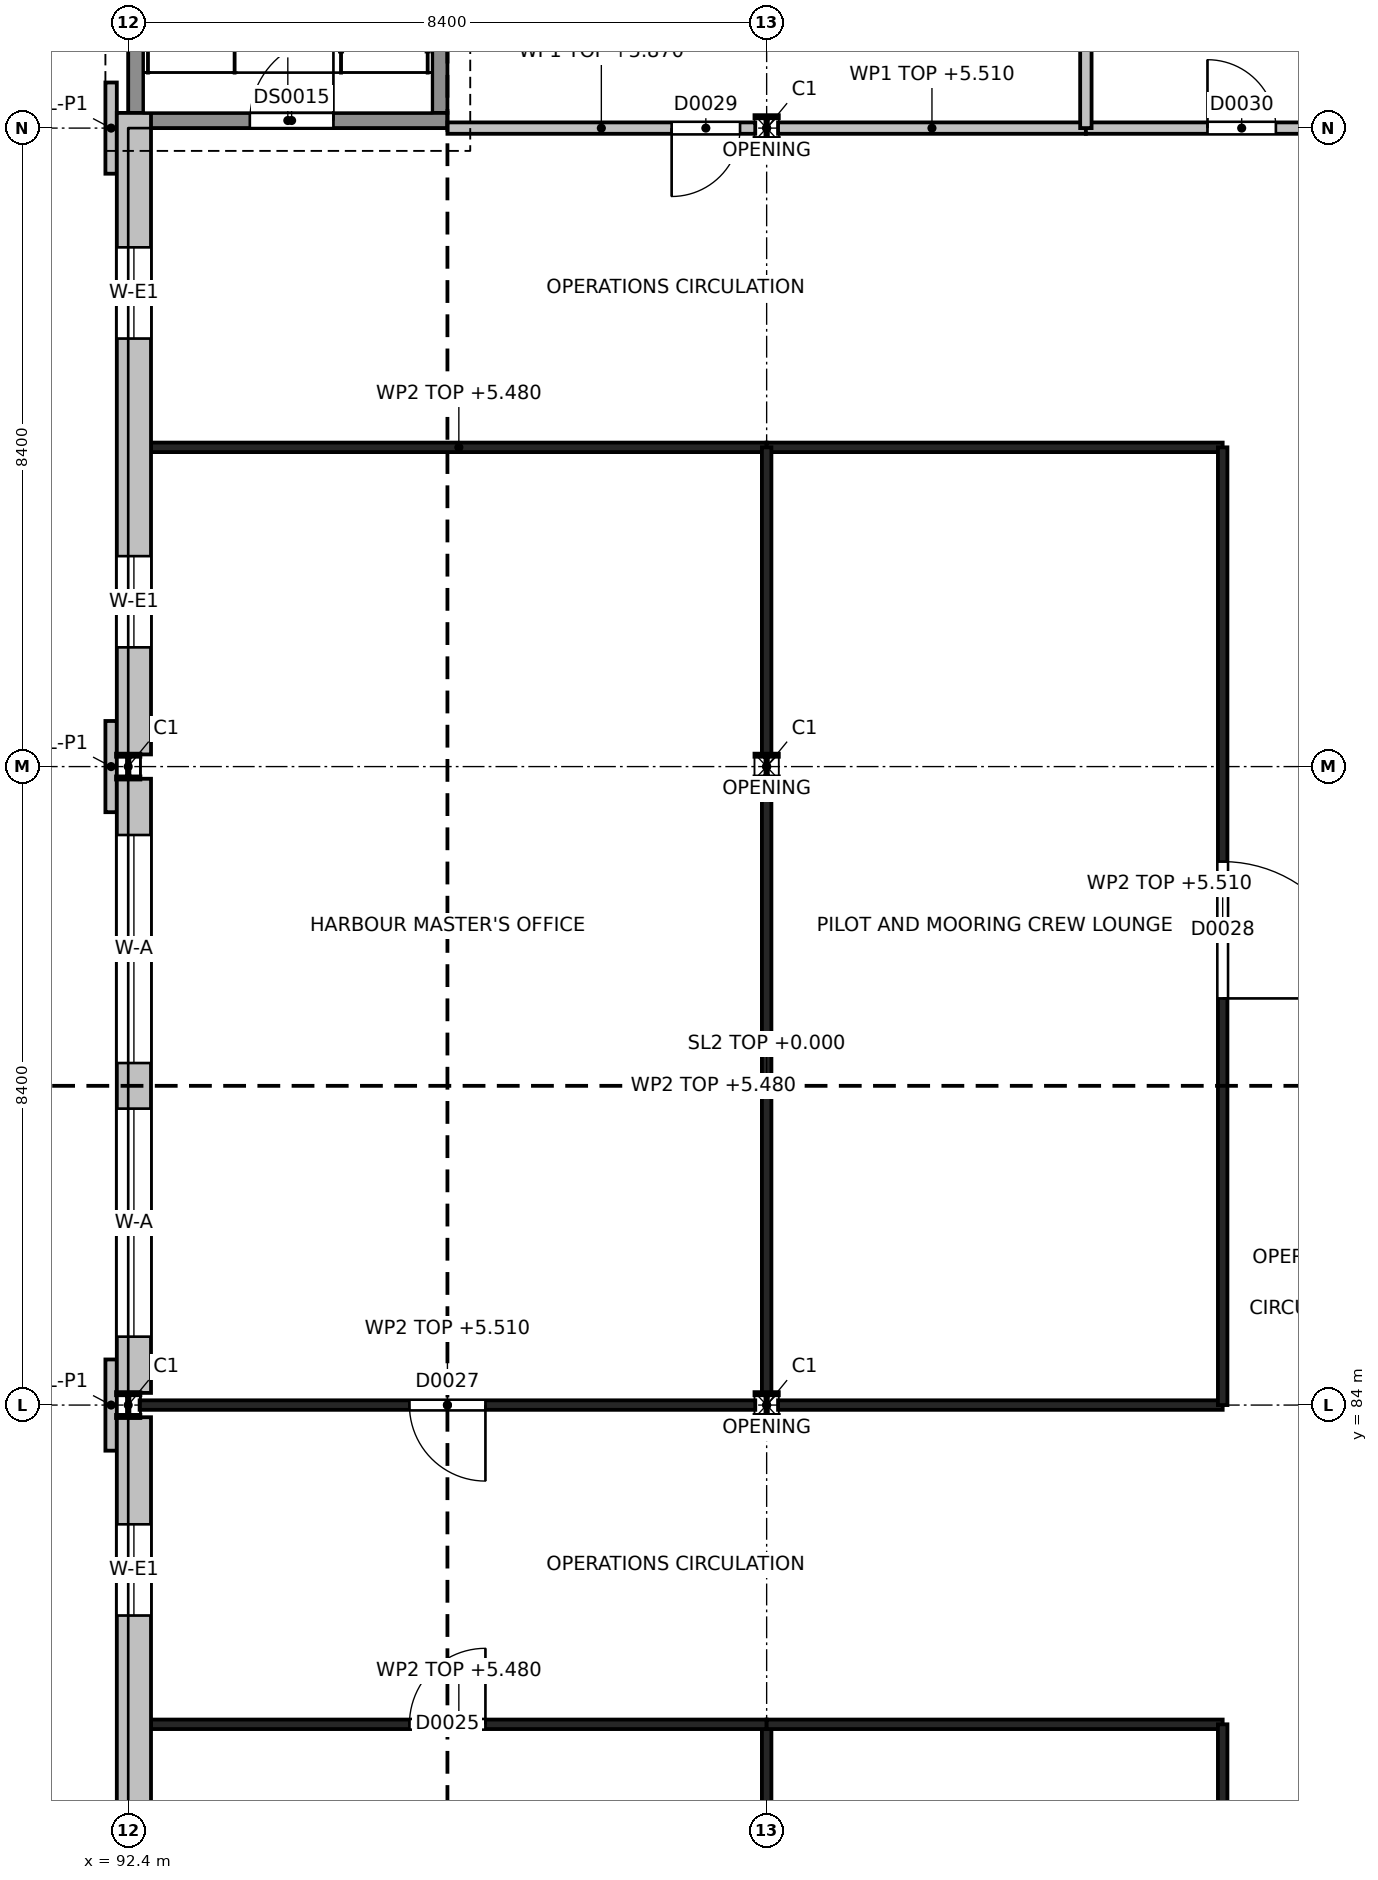
"""IFC4 building model, lengths in metres.
Left out: names, types, materials, properties, quantities, classifications, styles, units other than length and angle.
Written with IfcOpenShell. Run it as: python <this file> out.ifc"""

import sys

from ifc_helpers import new_model, si_unit, direction, frame, frame_2d, origin, origin_2d, place, context, subcontext, project, spatial, rectangle, i_section, extrude, element, fill, save


model = new_model("IFC4")
c1 = context("Model", 3, precision=1e-05, world=origin(), true_north=direction((0.0, 1.0)))
c2 = subcontext(c1, "Body", "Model", "MODEL_VIEW")
j1 = project(units=[si_unit("LENGTHUNIT", "METRE"), si_unit("PLANEANGLEUNIT", "RADIAN")], contexts=[c1])
p1 = place(None, origin())
s1 = spatial("IfcSite", under=j1, at=p1, CompositionType="ELEMENT")
p2 = place(p1, origin())
s2 = spatial("IfcBuilding", under=s1, at=p2, CompositionType="ELEMENT")
p3 = place(p2, origin())
s3 = spatial("IfcBuildingStorey", under=s2, at=p3, CompositionType="ELEMENT", Elevation=0.0)
for number, where, z_axis, x_axis in (
    (1, (92.4, 84.0, -1.35), (0.0, 0.0, 1.0), (1.0, 0.0, 0.0)),
    (2, (92.4, 92.4, -1.35), (0.0, 0.0, 1.0), (1.0, 0.0, 0.0)),
    (3, (100.8, 84.0, -1.35), (0.0, 0.0, 1.0), (1.0, 0.0, 0.0)),
    (4, (100.8, 92.4, -1.35), (0.0, 0.0, 1.0), (1.0, 0.0, 0.0)),
    (5, (100.8, 100.8, -1.35), (0.0, 0.0, 1.0), (1.0, 0.0, 0.0)),
):
    element("IfcColumn", number, at=place(p3, frame(where, z_axis=z_axis, x_axis=x_axis)), inside=s3, PredefinedType="COLUMN", context=c2, shape_type="SweptSolid", body=[
        extrude(i_section(OverallWidth=0.3, OverallDepth=0.32, WebThickness=0.011, FlangeThickness=0.021, at=origin_2d()), origin(), (0.0, 0.0, 1.0), 7.35),
    ])
p4 = place(p3, frame((92.4, 100.9, -1.35), z_axis=(0.0, 0.0, 1.0), x_axis=(1.0, 0.0, 0.0)))
e6 = element("IfcWall", 6, at=p4, inside=s3, PredefinedType="SHEAR", context=c2, shape_type="SweptSolid", body=[
    extrude(rectangle(XDim=4.2, YDim=0.2, at=frame_2d((2.1, 0.0))), origin(), (0.0, 0.0, 1.0), 7.35),
])
p5 = place(p4, frame((1.6, 0.0, 1.35)))
e7 = element("IfcOpeningElement", 7, at=p5, cuts=e6, PredefinedType="OPENING", context=c2, shape_type="SweptSolid", body=[
    extrude(rectangle(XDim=1.1, YDim=2.1, at=frame_2d((0.55, 1.05))), frame((0.0, 0.1, 0.0), z_axis=(0.0, -1.0, 0.0), x_axis=(1.0, 0.0, 0.0)), (0.0, 0.0, 1.0), 0.2),
])
p6 = place(p3, frame((92.5, 101.0, -1.35), z_axis=(0.0, 0.0, 1.0), x_axis=(0.0, 1.0, 0.0)))
e8 = element("IfcWall", 8, at=p6, inside=s3, PredefinedType="SHEAR", context=c2, shape_type="SweptSolid", body=[
    extrude(rectangle(XDim=8.0, YDim=0.2, at=frame_2d((4.0, 0.0))), origin(), (0.0, 0.0, 1.0), 7.35),
])
p7 = place(p6, frame((3.25, 0.0, 1.35)))
e9 = element("IfcOpeningElement", 9, at=p7, cuts=e8, PredefinedType="OPENING", context=c2, shape_type="SweptSolid", body=[
    extrude(rectangle(XDim=1.5, YDim=2.4, at=frame_2d((0.75, 1.2))), frame((0.0, 0.1, 0.0), z_axis=(0.0, -1.0, 0.0), x_axis=(1.0, 0.0, 0.0)), (0.0, 0.0, 1.0), 0.2),
])
p8 = place(p3, frame((96.5, 101.0, -1.35), z_axis=(0.0, 0.0, 1.0), x_axis=(0.0, 1.0, 0.0)))
e10 = element("IfcWall", 10, at=p8, inside=s3, PredefinedType="SHEAR", context=c2, shape_type="SweptSolid", body=[
    extrude(rectangle(XDim=8.0, YDim=0.2, at=frame_2d((4.0, 0.0))), origin(), (0.0, 0.0, 1.0), 7.35),
])
p9 = place(p3, frame((92.475, 75.76, 0.0), z_axis=(0.0, 0.0, 1.0), x_axis=(0.0, 1.0, 0.0)))
e11 = element("IfcWall", 11, at=p9, inside=s3, PredefinedType="SOLIDWALL", context=c2, shape_type="SweptSolid", body=[
    extrude(rectangle(XDim=8.08, YDim=0.45, at=frame_2d((4.04, 0.0))), origin(), (0.0, 0.0, 1.0), 5.25),
])
p10 = place(p9, frame((1.409, 0.0, 0.9)))
e12 = element("IfcOpeningElement", 12, at=p10, cuts=e11, PredefinedType="OPENING", context=c2, shape_type="SweptSolid", body=[
    extrude(rectangle(XDim=1.2, YDim=3.0, at=frame_2d((0.6, 1.5))), frame((0.0, 0.225, 0.0), z_axis=(0.0, -1.0, 0.0), x_axis=(1.0, 0.0, 0.0)), (0.0, 0.0, 1.0), 0.45),
])
p11 = place(p9, frame((5.471, 0.0, 0.9)))
e13 = element("IfcOpeningElement", 13, at=p11, cuts=e11, PredefinedType="OPENING", context=c2, shape_type="SweptSolid", body=[
    extrude(rectangle(XDim=1.2, YDim=3.0, at=frame_2d((0.6, 1.5))), frame((0.0, 0.225, 0.0), z_axis=(0.0, -1.0, 0.0), x_axis=(1.0, 0.0, 0.0)), (0.0, 0.0, 1.0), 0.45),
])
p12 = place(p3, frame((92.475, 84.16, 0.0), z_axis=(0.0, 0.0, 1.0), x_axis=(0.0, 1.0, 0.0)))
e14 = element("IfcWall", 14, at=p12, inside=s3, PredefinedType="SOLIDWALL", context=c2, shape_type="SweptSolid", body=[
    extrude(rectangle(XDim=8.08, YDim=0.45, at=frame_2d((4.04, 0.0))), origin(), (0.0, 0.0, 1.0), 5.25),
])
p13 = place(p12, frame((0.74, 0.0, 0.9)))
e15 = element("IfcOpeningElement", 15, at=p13, cuts=e14, PredefinedType="OPENING", context=c2, shape_type="SweptSolid", body=[
    extrude(rectangle(XDim=3.0, YDim=3.6, at=frame_2d((1.5, 1.8))), frame((0.0, 0.225, 0.0), z_axis=(0.0, -1.0, 0.0), x_axis=(1.0, 0.0, 0.0)), (0.0, 0.0, 1.0), 0.45),
])
p14 = place(p12, frame((4.34, 0.0, 0.9)))
e16 = element("IfcOpeningElement", 16, at=p14, cuts=e14, PredefinedType="OPENING", context=c2, shape_type="SweptSolid", body=[
    extrude(rectangle(XDim=3.0, YDim=3.6, at=frame_2d((1.5, 1.8))), frame((0.0, 0.225, 0.0), z_axis=(0.0, -1.0, 0.0), x_axis=(1.0, 0.0, 0.0)), (0.0, 0.0, 1.0), 0.45),
])
p15 = place(p3, frame((92.475, 92.56, 0.0), z_axis=(0.0, 0.0, 1.0), x_axis=(0.0, 1.0, 0.0)))
e17 = element("IfcWall", 17, at=p15, inside=s3, PredefinedType="SOLIDWALL", context=c2, shape_type="SweptSolid", body=[
    extrude(rectangle(XDim=8.44, YDim=0.45, at=frame_2d((4.22, 0.0))), origin(), (0.0, 0.0, 1.0), 5.25),
])
p16 = place(p15, frame((1.409, 0.0, 0.9)))
e18 = element("IfcOpeningElement", 18, at=p16, cuts=e17, PredefinedType="OPENING", context=c2, shape_type="SweptSolid", body=[
    extrude(rectangle(XDim=1.2, YDim=3.0, at=frame_2d((0.6, 1.5))), frame((0.0, 0.225, 0.0), z_axis=(0.0, -1.0, 0.0), x_axis=(1.0, 0.0, 0.0)), (0.0, 0.0, 1.0), 0.45),
])
p17 = place(p15, frame((5.471, 0.0, 0.9)))
e19 = element("IfcOpeningElement", 19, at=p17, cuts=e17, PredefinedType="OPENING", context=c2, shape_type="SweptSolid", body=[
    extrude(rectangle(XDim=1.2, YDim=3.0, at=frame_2d((0.6, 1.5))), frame((0.0, 0.225, 0.0), z_axis=(0.0, -1.0, 0.0), x_axis=(1.0, 0.0, 0.0)), (0.0, 0.0, 1.0), 0.45),
])
p18 = place(p3, frame((92.175, 83.4, 0.0), z_axis=(0.0, 0.0, 1.0), x_axis=(0.0, 1.0, 0.0)))
e20 = element("IfcWall", 20, at=p18, inside=s3, PredefinedType="SOLIDWALL", context=c2, shape_type="SweptSolid", body=[
    extrude(rectangle(XDim=1.2, YDim=0.15, at=frame_2d((0.6, 0.0))), origin(), (0.0, 0.0, 1.0), 6.0),
])
for number, where, z_axis, x_axis in (
    (21, (92.175, 91.8, 0.0), (0.0, 0.0, 1.0), (0.0, 1.0, 0.0)),
    (22, (92.175, 100.2, 0.0), (0.0, 0.0, 1.0), (0.0, 1.0, 0.0)),
):
    element("IfcWall", number, at=place(p3, frame(where, z_axis=z_axis, x_axis=x_axis)), inside=s3, PredefinedType="SOLIDWALL", context=c2, shape_type="SweptSolid", body=[
        extrude(rectangle(XDim=1.2, YDim=0.15, at=frame_2d((0.6, 0.0))), origin(), (0.0, 0.0, 1.0), 6.0),
    ])
p19 = place(p3, frame((100.8, 75.76, 0.0), z_axis=(0.0, 0.0, 1.0), x_axis=(0.0, 1.0, 0.0)))
e23 = element("IfcWall", 23, at=p19, inside=s3, PredefinedType="PARTITIONING", context=c2, shape_type="SweptSolid", body=[
    extrude(rectangle(XDim=4.04, YDim=0.125, at=frame_2d((2.02, 0.0))), origin(), (0.0, 0.0, 1.0), 5.48),
])
p20 = place(p3, frame((92.7, 79.8, 0.0), z_axis=(0.0, 0.0, 1.0), x_axis=(1.0, 0.0, 0.0)))
e24 = element("IfcWall", 24, at=p20, inside=s3, PredefinedType="PARTITIONING", context=c2, shape_type="SweptSolid", body=[
    extrude(rectangle(XDim=8.1, YDim=0.125, at=frame_2d((4.05, 0.0))), origin(), (0.0, 0.0, 1.0), 5.48),
])
p21 = place(p20, frame((3.399, 0.0, 0.0)))
e25 = element("IfcOpeningElement", 25, at=p21, cuts=e24, PredefinedType="OPENING", context=c2, shape_type="SweptSolid", body=[
    extrude(rectangle(XDim=1.0, YDim=2.2, at=frame_2d((0.5, 1.1))), frame((0.0, 0.062, 0.0), z_axis=(0.0, -1.0, 0.0), x_axis=(1.0, 0.0, 0.0)), (0.0, 0.0, 1.0), 0.125),
])
p22 = place(p3, frame((100.8, 79.8, 0.0), z_axis=(0.0, 0.0, 1.0), x_axis=(1.0, 0.0, 0.0)))
e26 = element("IfcWall", 26, at=p22, inside=s3, PredefinedType="PARTITIONING", context=c2, shape_type="SweptSolid", body=[
    extrude(rectangle(XDim=6.0, YDim=0.125, at=frame_2d((3.0, 0.0))), origin(), (0.0, 0.0, 1.0), 5.48),
])
p23 = place(p3, frame((106.8, 69.6, 0.0), z_axis=(0.0, 0.0, 1.0), x_axis=(0.0, 1.0, 0.0)))
e27 = element("IfcWall", 27, at=p23, inside=s3, PredefinedType="PARTITIONING", context=c2, shape_type="SweptSolid", body=[
    extrude(rectangle(XDim=10.2, YDim=0.125, at=frame_2d((5.1, 0.0))), origin(), (0.0, 0.0, 1.0), 5.51),
])
p24 = place(p23, frame((4.15, 0.0, 0.0)))
e28 = element("IfcOpeningElement", 28, at=p24, cuts=e27, PredefinedType="OPENING", context=c2, shape_type="SweptSolid", body=[
    extrude(rectangle(XDim=1.8, YDim=2.1, at=frame_2d((0.9, 1.05))), frame((0.0, 0.062, 0.0), z_axis=(0.0, -1.0, 0.0), x_axis=(1.0, 0.0, 0.0)), (0.0, 0.0, 1.0), 0.125),
])
p25 = place(p3, frame((92.55, 84.0, 0.0), z_axis=(0.0, 0.0, 1.0), x_axis=(1.0, 0.0, 0.0)))
e29 = element("IfcWall", 29, at=p25, inside=s3, PredefinedType="PARTITIONING", context=c2, shape_type="SweptSolid", body=[
    extrude(rectangle(XDim=8.1, YDim=0.125, at=frame_2d((4.05, 0.0))), origin(), (0.0, 0.0, 1.0), 5.51),
])
p26 = place(p25, frame((3.55, 0.0, 0.0)))
e30 = element("IfcOpeningElement", 30, at=p26, cuts=e29, PredefinedType="OPENING", context=c2, shape_type="SweptSolid", body=[
    extrude(rectangle(XDim=1.0, YDim=2.2, at=frame_2d((0.5, 1.1))), frame((0.0, 0.062, 0.0), z_axis=(0.0, -1.0, 0.0), x_axis=(1.0, 0.0, 0.0)), (0.0, 0.0, 1.0), 0.125),
])
p27 = place(p3, frame((92.7, 96.6, 0.0), z_axis=(0.0, 0.0, 1.0), x_axis=(1.0, 0.0, 0.0)))
e31 = element("IfcWall", 31, at=p27, inside=s3, PredefinedType="PARTITIONING", context=c2, shape_type="SweptSolid", body=[
    extrude(rectangle(XDim=8.1, YDim=0.125, at=frame_2d((4.05, 0.0))), origin(), (0.0, 0.0, 1.0), 5.48),
])
p28 = place(p3, frame((100.95, 84.0, 0.0), z_axis=(0.0, 0.0, 1.0), x_axis=(1.0, 0.0, 0.0)))
e32 = element("IfcWall", 32, at=p28, inside=s3, PredefinedType="PARTITIONING", context=c2, shape_type="SweptSolid", body=[
    extrude(rectangle(XDim=5.85, YDim=0.125, at=frame_2d((2.925, 0.0))), origin(), (0.0, 0.0, 1.0), 5.51),
])
p29 = place(p3, frame((100.8, 96.6, 0.0), z_axis=(0.0, 0.0, 1.0), x_axis=(1.0, 0.0, 0.0)))
e33 = element("IfcWall", 33, at=p29, inside=s3, PredefinedType="PARTITIONING", context=c2, shape_type="SweptSolid", body=[
    extrude(rectangle(XDim=6.0, YDim=0.125, at=frame_2d((3.0, 0.0))), origin(), (0.0, 0.0, 1.0), 5.48),
])
p30 = place(p3, frame((106.8, 84.0, 0.0), z_axis=(0.0, 0.0, 1.0), x_axis=(0.0, 1.0, 0.0)))
e34 = element("IfcWall", 34, at=p30, inside=s3, PredefinedType="PARTITIONING", context=c2, shape_type="SweptSolid", body=[
    extrude(rectangle(XDim=12.6, YDim=0.125, at=frame_2d((6.3, 0.0))), origin(), (0.0, 0.0, 1.0), 5.51),
])
p31 = place(p30, frame((5.35, 0.0, 0.0)))
e35 = element("IfcOpeningElement", 35, at=p31, cuts=e34, PredefinedType="OPENING", context=c2, shape_type="SweptSolid", body=[
    extrude(rectangle(XDim=1.8, YDim=2.1, at=frame_2d((0.9, 1.05))), frame((0.0, 0.062, 0.0), z_axis=(0.0, -1.0, 0.0), x_axis=(1.0, 0.0, 0.0)), (0.0, 0.0, 1.0), 0.125),
])
p32 = place(p3, frame((96.6, 100.8, 0.0), z_axis=(0.0, 0.0, 1.0), x_axis=(1.0, 0.0, 0.0)))
e36 = element("IfcWall", 36, at=p32, inside=s3, PredefinedType="PARTITIONING", context=c2, shape_type="SweptSolid", body=[
    extrude(rectangle(XDim=4.05, YDim=0.15, at=frame_2d((2.025, 0.0))), origin(), (0.0, 0.0, 1.0), 5.87),
])
p33 = place(p32, frame((2.95, 0.0, 0.0)))
e37 = element("IfcOpeningElement", 37, at=p33, cuts=e36, PredefinedType="OPENING", context=c2, shape_type="SweptSolid", body=[
    extrude(rectangle(XDim=0.9, YDim=2.1, at=frame_2d((0.45, 1.05))), frame((0.0, 0.075, 0.0), z_axis=(0.0, -1.0, 0.0), x_axis=(1.0, 0.0, 0.0)), (0.0, 0.0, 1.0), 0.15),
])
p34 = place(p3, frame((100.95, 100.8, 0.0), z_axis=(0.0, 0.0, 1.0), x_axis=(1.0, 0.0, 0.0)))
e38 = element("IfcWall", 38, at=p34, inside=s3, PredefinedType="PARTITIONING", context=c2, shape_type="SweptSolid", body=[
    extrude(rectangle(XDim=4.05, YDim=0.15, at=frame_2d((2.025, 0.0))), origin(), (0.0, 0.0, 1.0), 5.51),
])
p35 = place(p3, frame((105.0, 100.8, 0.0), z_axis=(0.0, 0.0, 1.0), x_axis=(1.0, 0.0, 0.0)))
e39 = element("IfcWall", 39, at=p35, inside=s3, PredefinedType="PARTITIONING", context=c2, shape_type="SweptSolid", body=[
    extrude(rectangle(XDim=4.05, YDim=0.15, at=frame_2d((2.025, 0.0))), origin(), (0.0, 0.0, 1.0), 5.51),
])
p36 = place(p35, frame((1.6, 0.0, 0.0)))
e40 = element("IfcOpeningElement", 40, at=p36, cuts=e39, PredefinedType="OPENING", context=c2, shape_type="SweptSolid", body=[
    extrude(rectangle(XDim=0.9, YDim=2.1, at=frame_2d((0.45, 1.05))), frame((0.0, 0.075, 0.0), z_axis=(0.0, -1.0, 0.0), x_axis=(1.0, 0.0, 0.0)), (0.0, 0.0, 1.0), 0.15),
])
p37 = place(p3, frame((100.8, 84.16, 0.0), z_axis=(0.0, 0.0, 1.0), x_axis=(0.0, 1.0, 0.0)))
e41 = element("IfcWall", 41, at=p37, inside=s3, PredefinedType="PARTITIONING", context=c2, shape_type="SweptSolid", body=[
    extrude(rectangle(XDim=8.08, YDim=0.125, at=frame_2d((4.04, 0.0))), origin(), (0.0, 0.0, 1.0), 5.48),
])
p38 = place(p3, frame((100.8, 92.56, 0.0), z_axis=(0.0, 0.0, 1.0), x_axis=(0.0, 1.0, 0.0)))
e42 = element("IfcWall", 42, at=p38, inside=s3, PredefinedType="PARTITIONING", context=c2, shape_type="SweptSolid", body=[
    extrude(rectangle(XDim=4.04, YDim=0.125, at=frame_2d((2.02, 0.0))), origin(), (0.0, 0.0, 1.0), 5.48),
])
p39 = place(p3, frame((105.0, 100.8, 0.0), z_axis=(0.0, 0.0, 1.0), x_axis=(0.0, 1.0, 0.0)))
e43 = element("IfcWall", 43, at=p39, inside=s3, PredefinedType="PARTITIONING", context=c2, shape_type="SweptSolid", body=[
    extrude(rectangle(XDim=8.109, YDim=0.15, at=frame_2d((4.055, 0.0))), origin(), (0.0, 0.0, 1.0), 5.51),
])
p40 = place(p11, origin())
e44 = element("IfcWindow", 44, at=p40, inside=s3, PartitioningType="SINGLE_PANEL", PredefinedType="WINDOW", context=c2, shape_type="SweptSolid", body=[
    extrude(rectangle(XDim=1.2, YDim=3.0, at=frame_2d((0.6, 1.5))), frame((0.0, 0.03, 0.0), z_axis=(0.0, -1.0, 0.0), x_axis=(1.0, 0.0, 0.0)), (0.0, 0.0, 1.0), 0.06),
])
fill(e13, e44)
p41 = place(p13, origin())
e45 = element("IfcWindow", 45, at=p41, inside=s3, PartitioningType="SINGLE_PANEL", PredefinedType="WINDOW", context=c2, shape_type="SweptSolid", body=[
    extrude(rectangle(XDim=3.0, YDim=3.6, at=frame_2d((1.5, 1.8))), frame((0.0, 0.03, 0.0), z_axis=(0.0, -1.0, 0.0), x_axis=(1.0, 0.0, 0.0)), (0.0, 0.0, 1.0), 0.06),
])
fill(e15, e45)
p42 = place(p14, origin())
e46 = element("IfcWindow", 46, at=p42, inside=s3, PartitioningType="SINGLE_PANEL", PredefinedType="WINDOW", context=c2, shape_type="SweptSolid", body=[
    extrude(rectangle(XDim=3.0, YDim=3.6, at=frame_2d((1.5, 1.8))), frame((0.0, 0.03, 0.0), z_axis=(0.0, -1.0, 0.0), x_axis=(1.0, 0.0, 0.0)), (0.0, 0.0, 1.0), 0.06),
])
fill(e16, e46)
p43 = place(p16, origin())
e47 = element("IfcWindow", 47, at=p43, inside=s3, PartitioningType="SINGLE_PANEL", PredefinedType="WINDOW", context=c2, shape_type="SweptSolid", body=[
    extrude(rectangle(XDim=1.2, YDim=3.0, at=frame_2d((0.6, 1.5))), frame((0.0, 0.03, 0.0), z_axis=(0.0, -1.0, 0.0), x_axis=(1.0, 0.0, 0.0)), (0.0, 0.0, 1.0), 0.06),
])
fill(e18, e47)
p44 = place(p17, origin())
e48 = element("IfcWindow", 48, at=p44, inside=s3, PartitioningType="SINGLE_PANEL", PredefinedType="WINDOW", context=c2, shape_type="SweptSolid", body=[
    extrude(rectangle(XDim=1.2, YDim=3.0, at=frame_2d((0.6, 1.5))), frame((0.0, 0.03, 0.0), z_axis=(0.0, -1.0, 0.0), x_axis=(1.0, 0.0, 0.0)), (0.0, 0.0, 1.0), 0.06),
])
fill(e19, e48)
p45 = place(p21, origin())
e49 = element("IfcDoor", 49, at=p45, inside=s3, OperationType="SINGLE_SWING_RIGHT", PredefinedType="DOOR", context=c2, shape_type="SweptSolid", body=[
    extrude(rectangle(XDim=1.0, YDim=2.2, at=frame_2d((0.5, 1.1))), frame((0.0, 0.025, 0.0), z_axis=(0.0, -1.0, 0.0), x_axis=(1.0, 0.0, 0.0)), (0.0, 0.0, 1.0), 0.05),
])
fill(e25, e49)
p46 = place(p26, origin())
e50 = element("IfcDoor", 50, at=p46, inside=s3, OperationType="SINGLE_SWING_RIGHT", PredefinedType="DOOR", context=c2, shape_type="SweptSolid", body=[
    extrude(rectangle(XDim=1.0, YDim=2.2, at=frame_2d((0.5, 1.1))), frame((0.0, 0.025, 0.0), z_axis=(0.0, -1.0, 0.0), x_axis=(1.0, 0.0, 0.0)), (0.0, 0.0, 1.0), 0.05),
])
fill(e30, e50)
p47 = place(p31, origin())
e51 = element("IfcDoor", 51, at=p47, inside=s3, OperationType="DOUBLE_DOOR_DOUBLE_SWING", PredefinedType="DOOR", context=c2, shape_type="SweptSolid", body=[
    extrude(rectangle(XDim=1.8, YDim=2.1, at=frame_2d((0.9, 1.05))), frame((0.0, 0.025, 0.0), z_axis=(0.0, -1.0, 0.0), x_axis=(1.0, 0.0, 0.0)), (0.0, 0.0, 1.0), 0.05),
])
fill(e35, e51)
p48 = place(p33, origin())
e52 = element("IfcDoor", 52, at=p48, inside=s3, OperationType="SINGLE_SWING_LEFT", PredefinedType="DOOR", context=c2, shape_type="SweptSolid", body=[
    extrude(rectangle(XDim=0.9, YDim=2.1, at=frame_2d((0.45, 1.05))), frame((0.0, 0.025, 0.0), z_axis=(0.0, -1.0, 0.0), x_axis=(1.0, 0.0, 0.0)), (0.0, 0.0, 1.0), 0.05),
])
fill(e37, e52)
p49 = place(p36, origin())
e53 = element("IfcDoor", 53, at=p49, inside=s3, OperationType="SINGLE_SWING_LEFT", PredefinedType="DOOR", context=c2, shape_type="SweptSolid", body=[
    extrude(rectangle(XDim=0.9, YDim=2.1, at=frame_2d((0.45, 1.05))), frame((0.0, 0.025, 0.0), z_axis=(0.0, -1.0, 0.0), x_axis=(1.0, 0.0, 0.0)), (0.0, 0.0, 1.0), 0.05),
])
fill(e40, e53)
p50 = place(p5, frame((1.1, 0.05, 0.0), z_axis=(0.0, 0.0, 1.0), x_axis=(-1.0, 0.0, 0.0)))
e54 = element("IfcDoor", 54, at=p50, inside=s3, OperationType="SINGLE_SWING_RIGHT", PredefinedType="DOOR", context=c2, shape_type="SweptSolid", body=[
    extrude(rectangle(XDim=1.1, YDim=2.1, at=frame_2d((0.55, 1.05))), frame((0.0, 0.025, 0.0), z_axis=(0.0, -1.0, 0.0), x_axis=(1.0, 0.0, 0.0)), (0.0, 0.0, 1.0), 0.05),
])
fill(e7, e54)
save(model, sys.argv[1])
